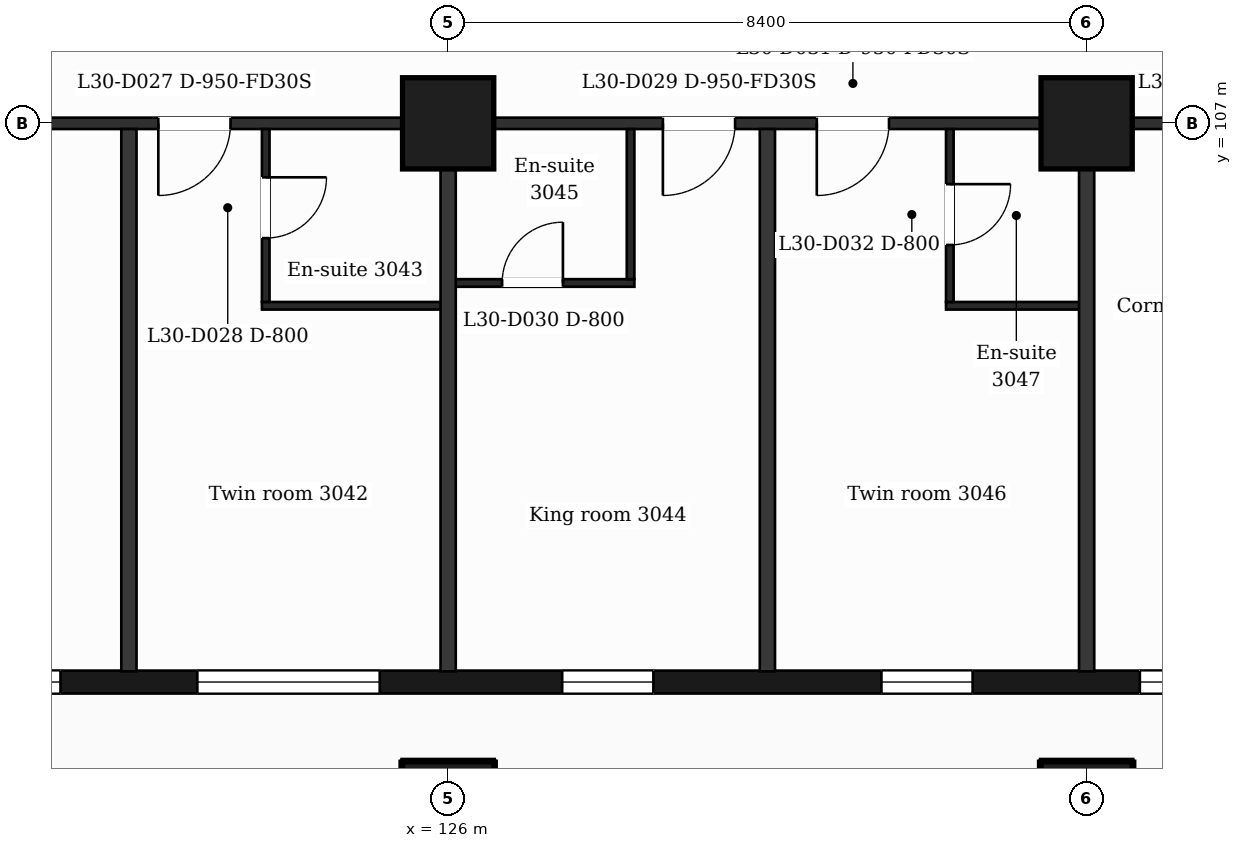
"""IFC4 building model, lengths in metres.
Left out: names, types, materials, properties, quantities, classifications, styles, units other than length and angle.
Written with IfcOpenShell. Run it as: python <this file> out.ifc"""

import sys

from ifc_helpers import new_model, si_unit, direction, frame, frame_2d, origin, origin_2d, place, context, subcontext, project, spatial, rectangle, extrude, element, fill, save


model = new_model("IFC4")
c1 = context("Model", 3, precision=1e-05, world=origin(), true_north=direction((0.0, 1.0)))
c2 = subcontext(c1, "Body", "Model", "MODEL_VIEW")
j1 = project(units=[si_unit("LENGTHUNIT", "METRE"), si_unit("PLANEANGLEUNIT", "RADIAN")], contexts=[c1])
p1 = place(None, origin())
s1 = spatial("IfcSite", under=j1, at=p1, CompositionType="ELEMENT")
p2 = place(p1, origin())
s2 = spatial("IfcBuilding", under=s1, at=p2, CompositionType="ELEMENT")
p3 = place(p2, frame((0.0, 0.0, 128.0)))
s3 = spatial("IfcBuildingStorey", under=s2, at=p3, CompositionType="ELEMENT", Elevation=128.0)
for number, where, z_axis, x_axis in (
    (1, (126.0, 98.0, 0.0), (0.0, 0.0, 1.0), (1.0, 0.0, 0.0)),
    (2, (134.4, 98.0, 0.0), (0.0, 0.0, 1.0), (1.0, 0.0, 0.0)),
    (3, (126.0, 107.0, 0.0), (0.0, 0.0, 1.0), (1.0, 0.0, 0.0)),
    (4, (134.4, 107.0, 0.0), (0.0, 0.0, 1.0), (1.0, 0.0, 0.0)),
):
    element("IfcColumn", number, at=place(p3, frame(where, z_axis=z_axis, x_axis=x_axis)), inside=s3, PredefinedType="COLUMN", context=c2, shape_type="SweptSolid", body=[
        extrude(rectangle(XDim=1.2, YDim=1.2, at=origin_2d()), origin(), (0.0, 0.0, 1.0), 3.7),
    ])
p4 = place(p3, frame((89.85, 99.65, 0.0), z_axis=(0.0, 0.0, 1.0), x_axis=(1.0, 0.0, 0.0)))
e5 = element("IfcWall", 5, at=p4, inside=s3, PredefinedType="SOLIDWALL", context=c2, shape_type="SweptSolid", body=[
    extrude(rectangle(XDim=47.25, YDim=0.3, at=frame_2d((23.625, 0.0))), origin(), (0.0, 0.0, 1.0), 3.38),
])
p5 = place(p4, frame((0.725, 0.0, 0.9)))
e6 = element("IfcOpeningElement", 6, at=p5, cuts=e5, PredefinedType="OPENING", context=c2, shape_type="SweptSolid", body=[
    extrude(rectangle(XDim=1.2, YDim=2.1, at=frame_2d((0.6, 1.05))), frame((0.0, 0.16, 0.0), z_axis=(0.0, -1.0, 0.0), x_axis=(1.0, 0.0, 0.0)), (0.0, 0.0, 1.0), 0.32),
])
p6 = place(p4, frame((3.45, 0.0, 0.9)))
e7 = element("IfcOpeningElement", 7, at=p6, cuts=e5, PredefinedType="OPENING", context=c2, shape_type="SweptSolid", body=[
    extrude(rectangle(XDim=2.4, YDim=2.1, at=frame_2d((1.2, 1.05))), frame((0.0, 0.16, 0.0), z_axis=(0.0, -1.0, 0.0), x_axis=(1.0, 0.0, 0.0)), (0.0, 0.0, 1.0), 0.32),
])
p7 = place(p4, frame((8.25, 0.0, 0.9)))
e8 = element("IfcOpeningElement", 8, at=p7, cuts=e5, PredefinedType="OPENING", context=c2, shape_type="SweptSolid", body=[
    extrude(rectangle(XDim=1.2, YDim=2.1, at=frame_2d((0.6, 1.05))), frame((0.0, 0.16, 0.0), z_axis=(0.0, -1.0, 0.0), x_axis=(1.0, 0.0, 0.0)), (0.0, 0.0, 1.0), 0.32),
])
p8 = place(p4, frame((12.45, 0.0, 0.9)))
e9 = element("IfcOpeningElement", 9, at=p8, cuts=e5, PredefinedType="OPENING", context=c2, shape_type="SweptSolid", body=[
    extrude(rectangle(XDim=1.2, YDim=2.1, at=frame_2d((0.6, 1.05))), frame((0.0, 0.16, 0.0), z_axis=(0.0, -1.0, 0.0), x_axis=(1.0, 0.0, 0.0)), (0.0, 0.0, 1.0), 0.32),
])
p9 = place(p4, frame((16.05, 0.0, 0.9)))
e10 = element("IfcOpeningElement", 10, at=p9, cuts=e5, PredefinedType="OPENING", context=c2, shape_type="SweptSolid", body=[
    extrude(rectangle(XDim=2.4, YDim=2.1, at=frame_2d((1.2, 1.05))), frame((0.0, 0.16, 0.0), z_axis=(0.0, -1.0, 0.0), x_axis=(1.0, 0.0, 0.0)), (0.0, 0.0, 1.0), 0.32),
])
p10 = place(p4, frame((20.25, 0.0, 0.9)))
e11 = element("IfcOpeningElement", 11, at=p10, cuts=e5, PredefinedType="OPENING", context=c2, shape_type="SweptSolid", body=[
    extrude(rectangle(XDim=2.4, YDim=2.1, at=frame_2d((1.2, 1.05))), frame((0.0, 0.16, 0.0), z_axis=(0.0, -1.0, 0.0), x_axis=(1.0, 0.0, 0.0)), (0.0, 0.0, 1.0), 0.32),
])
p11 = place(p4, frame((25.05, 0.0, 0.0)))
e12 = element("IfcOpeningElement", 12, at=p11, cuts=e5, PredefinedType="OPENING", context=c2, shape_type="SweptSolid", body=[
    extrude(rectangle(XDim=1.2, YDim=2.4, at=frame_2d((0.6, 1.2))), frame((0.0, 0.16, 0.0), z_axis=(0.0, -1.0, 0.0), x_axis=(1.0, 0.0, 0.0)), (0.0, 0.0, 1.0), 0.32),
])
p12 = place(p4, frame((28.65, 0.0, 0.9)))
e13 = element("IfcOpeningElement", 13, at=p12, cuts=e5, PredefinedType="OPENING", context=c2, shape_type="SweptSolid", body=[
    extrude(rectangle(XDim=2.4, YDim=2.1, at=frame_2d((1.2, 1.05))), frame((0.0, 0.16, 0.0), z_axis=(0.0, -1.0, 0.0), x_axis=(1.0, 0.0, 0.0)), (0.0, 0.0, 1.0), 0.32),
])
p13 = place(p4, frame((32.85, 0.0, 0.9)))
e14 = element("IfcOpeningElement", 14, at=p13, cuts=e5, PredefinedType="OPENING", context=c2, shape_type="SweptSolid", body=[
    extrude(rectangle(XDim=2.4, YDim=2.1, at=frame_2d((1.2, 1.05))), frame((0.0, 0.16, 0.0), z_axis=(0.0, -1.0, 0.0), x_axis=(1.0, 0.0, 0.0)), (0.0, 0.0, 1.0), 0.32),
])
p14 = place(p4, frame((37.65, 0.0, 0.9)))
e15 = element("IfcOpeningElement", 15, at=p14, cuts=e5, PredefinedType="OPENING", context=c2, shape_type="SweptSolid", body=[
    extrude(rectangle(XDim=1.2, YDim=2.1, at=frame_2d((0.6, 1.05))), frame((0.0, 0.16, 0.0), z_axis=(0.0, -1.0, 0.0), x_axis=(1.0, 0.0, 0.0)), (0.0, 0.0, 1.0), 0.32),
])
p15 = place(p4, frame((41.85, 0.0, 0.9)))
e16 = element("IfcOpeningElement", 16, at=p15, cuts=e5, PredefinedType="OPENING", context=c2, shape_type="SweptSolid", body=[
    extrude(rectangle(XDim=1.2, YDim=2.1, at=frame_2d((0.6, 1.05))), frame((0.0, 0.16, 0.0), z_axis=(0.0, -1.0, 0.0), x_axis=(1.0, 0.0, 0.0)), (0.0, 0.0, 1.0), 0.32),
])
p16 = place(p4, frame((45.25, 0.0, 0.9)))
e17 = element("IfcOpeningElement", 17, at=p16, cuts=e5, PredefinedType="OPENING", context=c2, shape_type="SweptSolid", body=[
    extrude(rectangle(XDim=1.2, YDim=2.1, at=frame_2d((0.6, 1.05))), frame((0.0, 0.16, 0.0), z_axis=(0.0, -1.0, 0.0), x_axis=(1.0, 0.0, 0.0)), (0.0, 0.0, 1.0), 0.32),
])
p17 = place(p3, frame((123.55, 104.6, 0.0), z_axis=(0.0, 0.0, 1.0), x_axis=(1.0, 0.0, 0.0)))
e18 = element("IfcWall", 18, at=p17, inside=s3, PredefinedType="PARTITIONING", context=c2, shape_type="SweptSolid", body=[
    extrude(rectangle(XDim=2.45, YDim=0.1, at=frame_2d((1.225, 0.0))), origin(), (0.0, 0.0, 1.0), 3.38),
])
p18 = place(p3, frame((132.55, 104.6, 0.0), z_axis=(0.0, 0.0, 1.0), x_axis=(1.0, 0.0, 0.0)))
e19 = element("IfcWall", 19, at=p18, inside=s3, PredefinedType="PARTITIONING", context=c2, shape_type="SweptSolid", body=[
    extrude(rectangle(XDim=1.85, YDim=0.1, at=frame_2d((0.925, 0.0))), origin(), (0.0, 0.0, 1.0), 3.38),
])
p19 = place(p3, frame((126.0, 104.9, 0.0), z_axis=(0.0, 0.0, 1.0), x_axis=(1.0, 0.0, 0.0)))
e20 = element("IfcWall", 20, at=p19, inside=s3, PredefinedType="PARTITIONING", context=c2, shape_type="SweptSolid", body=[
    extrude(rectangle(XDim=2.45, YDim=0.1, at=frame_2d((1.225, 0.0))), origin(), (0.0, 0.0, 1.0), 3.38),
])
p20 = place(p19, frame((0.71, 0.0, 0.0)))
e21 = element("IfcOpeningElement", 21, at=p20, cuts=e20, PredefinedType="OPENING", context=c2, shape_type="SweptSolid", body=[
    extrude(rectangle(XDim=0.8, YDim=2.1, at=frame_2d((0.4, 1.05))), frame((0.0, 0.06, 0.0), z_axis=(0.0, -1.0, 0.0), x_axis=(1.0, 0.0, 0.0)), (0.0, 0.0, 1.0), 0.12),
])
p21 = place(p3, frame((87.018, 107.0, 0.0), z_axis=(0.0, 0.0, 1.0), x_axis=(1.0, 0.0, 0.0)))
e22 = element("IfcWall", 22, at=p21, inside=s3, PredefinedType="PARTITIONING", context=c2, shape_type="SweptSolid", body=[
    extrude(rectangle(XDim=52.765, YDim=0.15, at=frame_2d((26.382, 0.0))), origin(), (0.0, 0.0, 1.0), 3.38),
])
p22 = place(p21, frame((1.276, 0.0, 0.0)))
e23 = element("IfcOpeningElement", 23, at=p22, cuts=e22, PredefinedType="OPENING", context=c2, shape_type="SweptSolid", body=[
    extrude(rectangle(XDim=0.95, YDim=2.1, at=frame_2d((0.475, 1.05))), frame((0.0, 0.085, 0.0), z_axis=(0.0, -1.0, 0.0), x_axis=(1.0, 0.0, 0.0)), (0.0, 0.0, 1.0), 0.17),
])
p23 = place(p21, frame((7.645, 0.0, 0.0)))
e24 = element("IfcOpeningElement", 24, at=p23, cuts=e22, PredefinedType="OPENING", context=c2, shape_type="SweptSolid", body=[
    extrude(rectangle(XDim=0.95, YDim=2.1, at=frame_2d((0.475, 1.05))), frame((0.0, 0.085, 0.0), z_axis=(0.0, -1.0, 0.0), x_axis=(1.0, 0.0, 0.0)), (0.0, 0.0, 1.0), 0.17),
])
p24 = place(p21, frame((16.812, 0.0, 0.0)))
e25 = element("IfcOpeningElement", 25, at=p24, cuts=e22, PredefinedType="OPENING", context=c2, shape_type="SweptSolid", body=[
    extrude(rectangle(XDim=1.0, YDim=2.1, at=frame_2d((0.5, 1.05))), frame((0.0, 0.085, 0.0), z_axis=(0.0, -1.0, 0.0), x_axis=(1.0, 0.0, 0.0)), (0.0, 0.0, 1.0), 0.17),
])
p25 = place(p21, frame((22.952, 0.0, 0.0)))
e26 = element("IfcOpeningElement", 26, at=p25, cuts=e22, PredefinedType="OPENING", context=c2, shape_type="SweptSolid", body=[
    extrude(rectangle(XDim=0.95, YDim=2.1, at=frame_2d((0.475, 1.05))), frame((0.0, 0.085, 0.0), z_axis=(0.0, -1.0, 0.0), x_axis=(1.0, 0.0, 0.0)), (0.0, 0.0, 1.0), 0.17),
])
p26 = place(p21, frame((31.742, 0.0, 0.0)))
e27 = element("IfcOpeningElement", 27, at=p26, cuts=e22, PredefinedType="OPENING", context=c2, shape_type="SweptSolid", body=[
    extrude(rectangle(XDim=0.95, YDim=2.1, at=frame_2d((0.475, 1.05))), frame((0.0, 0.085, 0.0), z_axis=(0.0, -1.0, 0.0), x_axis=(1.0, 0.0, 0.0)), (0.0, 0.0, 1.0), 0.17),
])
p27 = place(p21, frame((35.169, 0.0, 0.0)))
e28 = element("IfcOpeningElement", 28, at=p27, cuts=e22, PredefinedType="OPENING", context=c2, shape_type="SweptSolid", body=[
    extrude(rectangle(XDim=0.95, YDim=2.1, at=frame_2d((0.475, 1.05))), frame((0.0, 0.085, 0.0), z_axis=(0.0, -1.0, 0.0), x_axis=(1.0, 0.0, 0.0)), (0.0, 0.0, 1.0), 0.17),
])
p28 = place(p21, frame((41.807, 0.0, 0.0)))
e29 = element("IfcOpeningElement", 29, at=p28, cuts=e22, PredefinedType="OPENING", context=c2, shape_type="SweptSolid", body=[
    extrude(rectangle(XDim=0.95, YDim=2.1, at=frame_2d((0.475, 1.05))), frame((0.0, 0.085, 0.0), z_axis=(0.0, -1.0, 0.0), x_axis=(1.0, 0.0, 0.0)), (0.0, 0.0, 1.0), 0.17),
])
p29 = place(p21, frame((43.832, 0.0, 0.0)))
e30 = element("IfcOpeningElement", 30, at=p29, cuts=e22, PredefinedType="OPENING", context=c2, shape_type="SweptSolid", body=[
    extrude(rectangle(XDim=0.95, YDim=2.1, at=frame_2d((0.475, 1.05))), frame((0.0, 0.085, 0.0), z_axis=(0.0, -1.0, 0.0), x_axis=(1.0, 0.0, 0.0)), (0.0, 0.0, 1.0), 0.17),
])
p30 = place(p21, frame((48.974, 0.0, 0.0)))
e31 = element("IfcOpeningElement", 31, at=p30, cuts=e22, PredefinedType="OPENING", context=c2, shape_type="SweptSolid", body=[
    extrude(rectangle(XDim=0.95, YDim=2.1, at=frame_2d((0.475, 1.05))), frame((0.0, 0.085, 0.0), z_axis=(0.0, -1.0, 0.0), x_axis=(1.0, 0.0, 0.0)), (0.0, 0.0, 1.0), 0.17),
])
p31 = place(p3, frame((121.8, 99.79, 0.0), z_axis=(0.0, 0.0, 1.0), x_axis=(0.0, 1.0, 0.0)))
e32 = element("IfcWall", 32, at=p31, inside=s3, PredefinedType="PARTITIONING", context=c2, shape_type="SweptSolid", body=[
    extrude(rectangle(XDim=7.135, YDim=0.2, at=frame_2d((3.567, 0.0))), origin(), (0.0, 0.0, 1.0), 3.38),
])
p32 = place(p3, frame((123.6, 104.65, 0.0), z_axis=(0.0, 0.0, 1.0), x_axis=(0.0, 1.0, 0.0)))
e33 = element("IfcWall", 33, at=p32, inside=s3, PredefinedType="PARTITIONING", context=c2, shape_type="SweptSolid", body=[
    extrude(rectangle(XDim=2.275, YDim=0.1, at=frame_2d((1.138, 0.0))), origin(), (0.0, 0.0, 1.0), 3.38),
])
p33 = place(p32, frame((0.84, 0.0, 0.0)))
e34 = element("IfcOpeningElement", 34, at=p33, cuts=e33, PredefinedType="OPENING", context=c2, shape_type="SweptSolid", body=[
    extrude(rectangle(XDim=0.8, YDim=2.1, at=frame_2d((0.4, 1.05))), frame((0.0, 0.06, 0.0), z_axis=(0.0, -1.0, 0.0), x_axis=(1.0, 0.0, 0.0)), (0.0, 0.0, 1.0), 0.12),
])
p34 = place(p3, frame((126.0, 99.79, 0.0), z_axis=(0.0, 0.0, 1.0), x_axis=(0.0, 1.0, 0.0)))
e35 = element("IfcWall", 35, at=p34, inside=s3, PredefinedType="PARTITIONING", context=c2, shape_type="SweptSolid", body=[
    extrude(rectangle(XDim=7.135, YDim=0.2, at=frame_2d((3.567, 0.0))), origin(), (0.0, 0.0, 1.0), 3.38),
])
p35 = place(p3, frame((128.4, 104.95, 0.0), z_axis=(0.0, 0.0, 1.0), x_axis=(0.0, 1.0, 0.0)))
e36 = element("IfcWall", 36, at=p35, inside=s3, PredefinedType="PARTITIONING", context=c2, shape_type="SweptSolid", body=[
    extrude(rectangle(XDim=1.975, YDim=0.1, at=frame_2d((0.988, 0.0))), origin(), (0.0, 0.0, 1.0), 3.38),
])
p36 = place(p3, frame((130.2, 99.79, 0.0), z_axis=(0.0, 0.0, 1.0), x_axis=(0.0, 1.0, 0.0)))
e37 = element("IfcWall", 37, at=p36, inside=s3, PredefinedType="PARTITIONING", context=c2, shape_type="SweptSolid", body=[
    extrude(rectangle(XDim=7.135, YDim=0.2, at=frame_2d((3.567, 0.0))), origin(), (0.0, 0.0, 1.0), 3.38),
])
p37 = place(p3, frame((132.6, 104.65, 0.0), z_axis=(0.0, 0.0, 1.0), x_axis=(0.0, 1.0, 0.0)))
e38 = element("IfcWall", 38, at=p37, inside=s3, PredefinedType="PARTITIONING", context=c2, shape_type="SweptSolid", body=[
    extrude(rectangle(XDim=2.275, YDim=0.1, at=frame_2d((1.138, 0.0))), origin(), (0.0, 0.0, 1.0), 3.38),
])
p38 = place(p37, frame((0.75, 0.0, 0.0)))
e39 = element("IfcOpeningElement", 39, at=p38, cuts=e38, PredefinedType="OPENING", context=c2, shape_type="SweptSolid", body=[
    extrude(rectangle(XDim=0.8, YDim=2.1, at=frame_2d((0.4, 1.05))), frame((0.0, 0.06, 0.0), z_axis=(0.0, -1.0, 0.0), x_axis=(1.0, 0.0, 0.0)), (0.0, 0.0, 1.0), 0.12),
])
p39 = place(p3, frame((134.4, 99.79, 0.0), z_axis=(0.0, 0.0, 1.0), x_axis=(0.0, 1.0, 0.0)))
e40 = element("IfcWall", 40, at=p39, inside=s3, PredefinedType="PARTITIONING", context=c2, shape_type="SweptSolid", body=[
    extrude(rectangle(XDim=7.135, YDim=0.2, at=frame_2d((3.567, 0.0))), origin(), (0.0, 0.0, 1.0), 3.38),
])
p40 = place(p12, origin())
e41 = element("IfcWindow", 41, at=p40, inside=s3, PartitioningType="SINGLE_PANEL", PredefinedType="WINDOW", context=c2, shape_type="SweptSolid", body=[
    extrude(rectangle(XDim=2.4, YDim=2.1, at=frame_2d((1.2, 1.05))), frame((0.0, 0.03, 0.0), z_axis=(0.0, -1.0, 0.0), x_axis=(1.0, 0.0, 0.0)), (0.0, 0.0, 1.0), 0.06),
])
fill(e13, e41)
p41 = place(p13, origin())
e42 = element("IfcWindow", 42, at=p41, inside=s3, PartitioningType="SINGLE_PANEL", PredefinedType="WINDOW", context=c2, shape_type="SweptSolid", body=[
    extrude(rectangle(XDim=2.4, YDim=2.1, at=frame_2d((1.2, 1.05))), frame((0.0, 0.03, 0.0), z_axis=(0.0, -1.0, 0.0), x_axis=(1.0, 0.0, 0.0)), (0.0, 0.0, 1.0), 0.06),
])
fill(e14, e42)
p42 = place(p14, origin())
e43 = element("IfcWindow", 43, at=p42, inside=s3, PartitioningType="SINGLE_PANEL", PredefinedType="WINDOW", context=c2, shape_type="SweptSolid", body=[
    extrude(rectangle(XDim=1.2, YDim=2.1, at=frame_2d((0.6, 1.05))), frame((0.0, 0.03, 0.0), z_axis=(0.0, -1.0, 0.0), x_axis=(1.0, 0.0, 0.0)), (0.0, 0.0, 1.0), 0.06),
])
fill(e15, e43)
p43 = place(p15, origin())
e44 = element("IfcWindow", 44, at=p43, inside=s3, PartitioningType="SINGLE_PANEL", PredefinedType="WINDOW", context=c2, shape_type="SweptSolid", body=[
    extrude(rectangle(XDim=1.2, YDim=2.1, at=frame_2d((0.6, 1.05))), frame((0.0, 0.03, 0.0), z_axis=(0.0, -1.0, 0.0), x_axis=(1.0, 0.0, 0.0)), (0.0, 0.0, 1.0), 0.06),
])
fill(e16, e44)
p44 = place(p16, origin())
e45 = element("IfcWindow", 45, at=p44, inside=s3, PartitioningType="SINGLE_PANEL", PredefinedType="WINDOW", context=c2, shape_type="SweptSolid", body=[
    extrude(rectangle(XDim=1.2, YDim=2.1, at=frame_2d((0.6, 1.05))), frame((0.0, 0.03, 0.0), z_axis=(0.0, -1.0, 0.0), x_axis=(1.0, 0.0, 0.0)), (0.0, 0.0, 1.0), 0.06),
])
fill(e17, e45)
p45 = place(p27, origin())
e46 = element("IfcDoor", 46, at=p45, inside=s3, OperationType="SINGLE_SWING_LEFT", PredefinedType="DOOR", context=c2, shape_type="SweptSolid", body=[
    extrude(rectangle(XDim=0.95, YDim=2.1, at=frame_2d((0.475, 1.05))), frame((0.0, 0.025, 0.0), z_axis=(0.0, -1.0, 0.0), x_axis=(1.0, 0.0, 0.0)), (0.0, 0.0, 1.0), 0.05),
])
fill(e28, e46)
p46 = place(p33, origin())
e47 = element("IfcDoor", 47, at=p46, inside=s3, OperationType="SINGLE_SWING_RIGHT", PredefinedType="DOOR", context=c2, shape_type="SweptSolid", body=[
    extrude(rectangle(XDim=0.8, YDim=2.1, at=frame_2d((0.4, 1.05))), frame((0.0, 0.025, 0.0), z_axis=(0.0, -1.0, 0.0), x_axis=(1.0, 0.0, 0.0)), (0.0, 0.0, 1.0), 0.05),
])
fill(e34, e47)
p47 = place(p28, origin())
e48 = element("IfcDoor", 48, at=p47, inside=s3, OperationType="SINGLE_SWING_LEFT", PredefinedType="DOOR", context=c2, shape_type="SweptSolid", body=[
    extrude(rectangle(XDim=0.95, YDim=2.1, at=frame_2d((0.475, 1.05))), frame((0.0, 0.025, 0.0), z_axis=(0.0, -1.0, 0.0), x_axis=(1.0, 0.0, 0.0)), (0.0, 0.0, 1.0), 0.05),
])
fill(e29, e48)
p48 = place(p20, origin())
e49 = element("IfcDoor", 49, at=p48, inside=s3, OperationType="SINGLE_SWING_RIGHT", PredefinedType="DOOR", context=c2, shape_type="SweptSolid", body=[
    extrude(rectangle(XDim=0.8, YDim=2.1, at=frame_2d((0.4, 1.05))), frame((0.0, 0.025, 0.0), z_axis=(0.0, -1.0, 0.0), x_axis=(1.0, 0.0, 0.0)), (0.0, 0.0, 1.0), 0.05),
])
fill(e21, e49)
p49 = place(p29, origin())
e50 = element("IfcDoor", 50, at=p49, inside=s3, OperationType="SINGLE_SWING_LEFT", PredefinedType="DOOR", context=c2, shape_type="SweptSolid", body=[
    extrude(rectangle(XDim=0.95, YDim=2.1, at=frame_2d((0.475, 1.05))), frame((0.0, 0.025, 0.0), z_axis=(0.0, -1.0, 0.0), x_axis=(1.0, 0.0, 0.0)), (0.0, 0.0, 1.0), 0.05),
])
fill(e30, e50)
p50 = place(p38, origin())
e51 = element("IfcDoor", 51, at=p50, inside=s3, OperationType="SINGLE_SWING_RIGHT", PredefinedType="DOOR", context=c2, shape_type="SweptSolid", body=[
    extrude(rectangle(XDim=0.8, YDim=2.1, at=frame_2d((0.4, 1.05))), frame((0.0, 0.025, 0.0), z_axis=(0.0, -1.0, 0.0), x_axis=(1.0, 0.0, 0.0)), (0.0, 0.0, 1.0), 0.05),
])
fill(e39, e51)
save(model, sys.argv[1])
